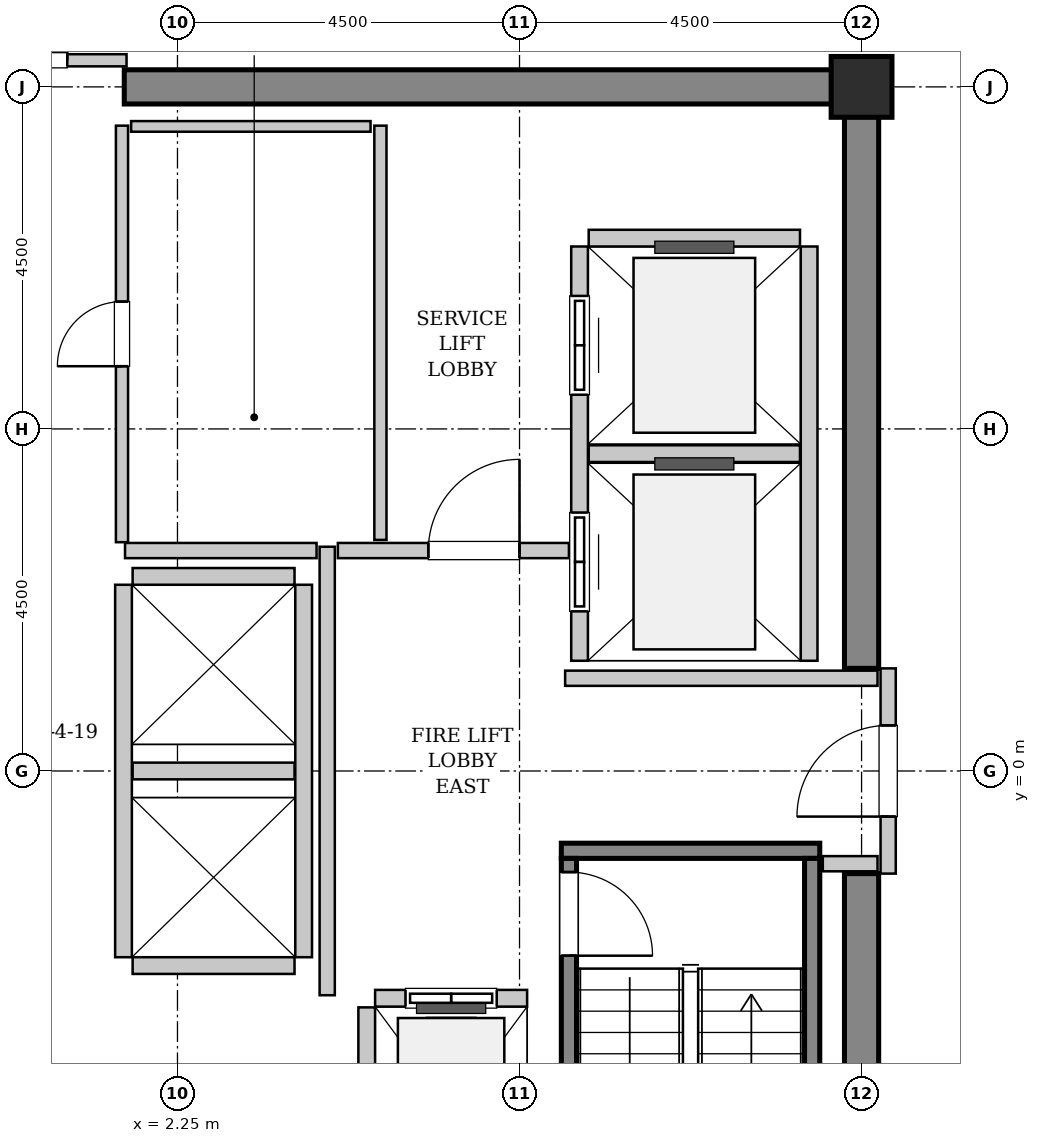
"""IFC4 building model, lengths in metres.
Left out: names, types, materials, properties, quantities, classifications, styles, units other than length and angle.
Written with IfcOpenShell. Run it as: python <this file> out.ifc"""

import sys

from ifc_helpers import new_model, si_unit, direction, frame, frame_2d, origin, origin_2d, place, context, subcontext, project, spatial, rectangle, hollow_rectangle, extrude, source, transform, mapped, element, fill, save


model = new_model("IFC4")
c1 = context("Model", 3, precision=1e-05, world=origin(), true_north=direction((0.0, 1.0)))
c2 = subcontext(c1, "Body", "Model", "MODEL_VIEW")
j1 = project(units=[si_unit("LENGTHUNIT", "METRE"), si_unit("PLANEANGLEUNIT", "RADIAN")], contexts=[c1])
p1 = place(None, origin())
s1 = spatial("IfcSite", under=j1, at=p1, CompositionType="ELEMENT")
p2 = place(p1, origin())
s2 = spatial("IfcBuilding", under=s1, at=p2, CompositionType="ELEMENT")
p3 = place(p2, frame((0.0, 0.0, 214.2)))
s3 = spatial("IfcBuildingStorey", under=s2, at=p3, CompositionType="ELEMENT", Elevation=214.2)
m1 = source(origin(), c2, "Body", "SweptSolid", [
    extrude(rectangle(XDim=9.925, YDim=0.45, at=frame_2d((4.962, 0.0))), origin(), (0.0, 0.0, 1.0), 3.8),
])
p4 = place(p3, frame((1.55, 9.0, 0.0), z_axis=(0.0, 0.0, 1.0), x_axis=(1.0, 0.0, 0.0)))
e1 = element("IfcWall", 1, at=p4, inside=s3, PredefinedType="SHEAR", context=c2, shape_type="MappedRepresentation", body=[
    mapped(m1, transform((0.0, 0.0, 0.0), x_axis=(1.0, 0.0, 0.0), y_axis=(0.0, 1.0, 0.0), z_axis=(0.0, 0.0, 1.0), scale=1.0)),
])
m2 = source(origin(), c2, "Body", "SweptSolid", [
    extrude(rectangle(XDim=7.425, YDim=0.45, at=frame_2d((3.712, 0.0))), origin(), (0.0, 0.0, 1.0), 3.8),
])
for number, where, z_axis, x_axis in (
    (2, (11.25, -8.775, 0.0), (0.0, 0.0, 1.0), (0.0, 1.0, 0.0)),
    (3, (11.25, 1.35, 0.0), (0.0, 0.0, 1.0), (0.0, 1.0, 0.0)),
):
    element("IfcWall", number, at=place(p3, frame(where, z_axis=z_axis, x_axis=x_axis)), inside=s3, PredefinedType="SHEAR", context=c2, shape_type="MappedRepresentation", body=[
        mapped(m2, transform((0.0, 0.0, 0.0), x_axis=(1.0, 0.0, 0.0), y_axis=(0.0, 1.0, 0.0), z_axis=(0.0, 0.0, 1.0), scale=1.0)),
    ])
m3 = source(origin(), c2, "Body", "SweptSolid", [
    extrude(hollow_rectangle(XDim=0.8, YDim=0.8, WallThickness=0.04, InnerFilletRadius=0.04, OuterFilletRadius=0.08, at=origin_2d()), origin(), (0.0, 0.0, 1.0), 3.8),
])
p5 = place(p3, frame((11.25, 9.0, 0.0), z_axis=(0.0, 0.0, 1.0), x_axis=(1.0, 0.0, 0.0)))
e4 = element("IfcColumn", 4, at=p5, inside=s3, PredefinedType="COLUMN", context=c2, shape_type="MappedRepresentation", body=[
    mapped(m3, transform((0.0, 0.0, 0.0), x_axis=(1.0, 0.0, 0.0), y_axis=(0.0, 1.0, 0.0), z_axis=(0.0, 0.0, 1.0), scale=1.0)),
])
m4 = source(origin(), c2, "Body", "SweptSolid", [
    extrude(rectangle(XDim=3.4, YDim=0.2, at=frame_2d((1.7, 0.0))), origin(), (0.0, 0.0, 1.0), 3.8),
])
p6 = place(p3, frame((7.3, -1.05, 0.0), z_axis=(0.0, 0.0, 1.0), x_axis=(1.0, 0.0, 0.0)))
e5 = element("IfcWall", 5, at=p6, inside=s3, PredefinedType="SOLIDWALL", context=c2, shape_type="MappedRepresentation", body=[
    mapped(m4, transform((0.0, 0.0, 0.0), x_axis=(1.0, 0.0, 0.0), y_axis=(0.0, 1.0, 0.0), z_axis=(0.0, 0.0, 1.0), scale=1.0)),
])
m5 = source(origin(), c2, "Body", "SweptSolid", [
    extrude(rectangle(XDim=7.1, YDim=0.2, at=frame_2d((3.55, 0.0))), origin(), (0.0, 0.0, 1.0), 3.8),
])
p7 = place(p3, frame((7.4, -1.15, 0.0), z_axis=(0.0, 0.0, 1.0), x_axis=(0.0, -1.0, 0.0)))
e6 = element("IfcWall", 6, at=p7, inside=s3, PredefinedType="SOLIDWALL", context=c2, shape_type="MappedRepresentation", body=[
    mapped(m5, transform((0.0, 0.0, 0.0), x_axis=(1.0, 0.0, 0.0), y_axis=(0.0, 1.0, 0.0), z_axis=(0.0, 0.0, 1.0), scale=1.0)),
])
p8 = place(p7, frame((0.18, 0.0, 0.0)))
e7 = element("IfcOpeningElement", 7, at=p8, cuts=e6, PredefinedType="OPENING", context=c2, shape_type="SweptSolid", body=[
    extrude(rectangle(XDim=1.1, YDim=2.15, at=frame_2d((0.55, 1.075))), frame((0.0, 0.11, 0.0), z_axis=(0.0, -1.0, 0.0), x_axis=(1.0, 0.0, 0.0)), (0.0, 0.0, 1.0), 0.22),
])
p9 = place(p3, frame((10.6, -1.15, 0.0), z_axis=(0.0, 0.0, 1.0), x_axis=(0.0, -1.0, 0.0)))
e8 = element("IfcWall", 8, at=p9, inside=s3, PredefinedType="SOLIDWALL", context=c2, shape_type="MappedRepresentation", body=[
    mapped(m5, transform((0.0, 0.0, 0.0), x_axis=(1.0, 0.0, 0.0), y_axis=(0.0, 1.0, 0.0), z_axis=(0.0, 0.0, 1.0), scale=1.0)),
])
m6 = source(origin(), c2, "Body", "SweptSolid", [
    extrude(rectangle(XDim=2.0, YDim=0.22, at=frame_2d((1.0, 0.0))), origin(), (0.0, 0.0, 1.0), 3.535),
])
p10 = place(p3, frame((6.85, -2.99, 0.0), z_axis=(0.0, 0.0, 1.0), x_axis=(-1.0, 0.0, 0.0)))
e9 = element("IfcWall", 9, at=p10, inside=s3, PredefinedType="SOLIDWALL", context=c2, shape_type="MappedRepresentation", body=[
    mapped(m6, transform((0.0, 0.0, 0.0), x_axis=(1.0, 0.0, 0.0), y_axis=(0.0, 1.0, 0.0), z_axis=(0.0, 0.0, 1.0), scale=1.0)),
])
p11 = place(p10, frame((0.4, 0.0, 0.0)))
e10 = element("IfcOpeningElement", 10, at=p11, cuts=e9, PredefinedType="OPENING", context=c2, shape_type="SweptSolid", body=[
    extrude(rectangle(XDim=1.2, YDim=2.2, at=frame_2d((0.6, 1.1))), frame((0.0, 0.12, 0.0), z_axis=(0.0, -1.0, 0.0), x_axis=(1.0, 0.0, 0.0)), (0.0, 0.0, 1.0), 0.24),
])
m7 = source(origin(), c2, "Body", "SweptSolid", [
    extrude(rectangle(XDim=2.68, YDim=0.22, at=frame_2d((1.34, 0.0))), origin(), (0.0, 0.0, 1.0), 3.535),
])
p12 = place(p3, frame((4.74, -3.11, 0.0), z_axis=(0.0, 0.0, 1.0), x_axis=(0.0, -1.0, 0.0)))
e11 = element("IfcWall", 11, at=p12, inside=s3, PredefinedType="SOLIDWALL", context=c2, shape_type="MappedRepresentation", body=[
    mapped(m7, transform((0.0, 0.0, 0.0), x_axis=(1.0, 0.0, 0.0), y_axis=(0.0, 1.0, 0.0), z_axis=(0.0, 0.0, 1.0), scale=1.0)),
])
m8 = source(origin(), c2, "Body", "SweptSolid", [
    extrude(rectangle(XDim=5.45, YDim=0.22, at=frame_2d((2.725, 0.0))), origin(), (0.0, 0.0, 1.0), 3.535),
])
p13 = place(p3, frame((7.54, 6.9, 0.0), z_axis=(0.0, 0.0, 1.0), x_axis=(0.0, -1.0, 0.0)))
e12 = element("IfcWall", 12, at=p13, inside=s3, PredefinedType="SOLIDWALL", context=c2, shape_type="MappedRepresentation", body=[
    mapped(m8, transform((0.0, 0.0, 0.0), x_axis=(1.0, 0.0, 0.0), y_axis=(0.0, 1.0, 0.0), z_axis=(0.0, 0.0, 1.0), scale=1.0)),
])
p14 = place(p13, frame((3.5, 0.0, 0.0)))
e13 = element("IfcOpeningElement", 13, at=p14, cuts=e12, PredefinedType="OPENING", context=c2, shape_type="SweptSolid", body=[
    extrude(rectangle(XDim=1.3, YDim=2.3, at=frame_2d((0.65, 1.15))), frame((0.0, 0.12, 0.0), z_axis=(0.0, -1.0, 0.0), x_axis=(1.0, 0.0, 0.0)), (0.0, 0.0, 1.0), 0.24),
])
p15 = place(p13, frame((0.65, 0.0, 0.0)))
e14 = element("IfcOpeningElement", 14, at=p15, cuts=e12, PredefinedType="OPENING", context=c2, shape_type="SweptSolid", body=[
    extrude(rectangle(XDim=1.3, YDim=2.3, at=frame_2d((0.65, 1.15))), frame((0.0, 0.12, 0.0), z_axis=(0.0, -1.0, 0.0), x_axis=(1.0, 0.0, 0.0)), (0.0, 0.0, 1.0), 0.24),
])
p16 = place(p3, frame((10.56, 1.45, 0.0), z_axis=(0.0, 0.0, 1.0), x_axis=(0.0, 1.0, 0.0)))
e15 = element("IfcWall", 15, at=p16, inside=s3, PredefinedType="SOLIDWALL", context=c2, shape_type="MappedRepresentation", body=[
    mapped(m8, transform((0.0, 0.0, 0.0), x_axis=(1.0, 0.0, 0.0), y_axis=(0.0, 1.0, 0.0), z_axis=(0.0, 0.0, 1.0), scale=1.0)),
])
m9 = source(origin(), c2, "Body", "SweptSolid", [
    extrude(rectangle(XDim=2.78, YDim=0.22, at=frame_2d((1.39, 0.0))), origin(), (0.0, 0.0, 1.0), 3.535),
])
for number, where, z_axis, x_axis in (
    (16, (7.66, 4.175, 0.0), (0.0, 0.0, 1.0), (1.0, 0.0, 0.0)),
    (17, (10.44, 7.01, 0.0), (0.0, 0.0, 1.0), (-1.0, 0.0, 0.0)),
):
    element("IfcWall", number, at=place(p3, frame(where, z_axis=z_axis, x_axis=x_axis)), inside=s3, PredefinedType="SOLIDWALL", context=c2, shape_type="MappedRepresentation", body=[
        mapped(m9, transform((0.0, 0.0, 0.0), x_axis=(1.0, 0.0, 0.0), y_axis=(0.0, 1.0, 0.0), z_axis=(0.0, 0.0, 1.0), scale=1.0)),
    ])
m10 = source(origin(), c2, "Body", "SweptSolid", [
    extrude(rectangle(XDim=4.9, YDim=0.22, at=frame_2d((2.45, 0.0))), origin(), (0.0, 0.0, 1.0), 3.535),
])
for number, where, z_axis, x_axis in (
    (18, (1.54, 2.45, 0.0), (0.0, 0.0, 1.0), (0.0, -1.0, 0.0)),
    (19, (3.91, -2.45, 0.0), (0.0, 0.0, 1.0), (0.0, 1.0, 0.0)),
):
    element("IfcWall", number, at=place(p3, frame(where, z_axis=z_axis, x_axis=x_axis)), inside=s3, PredefinedType="SOLIDWALL", context=c2, shape_type="MappedRepresentation", body=[
        mapped(m10, transform((0.0, 0.0, 0.0), x_axis=(1.0, 0.0, 0.0), y_axis=(0.0, 1.0, 0.0), z_axis=(0.0, 0.0, 1.0), scale=1.0)),
    ])
m11 = source(origin(), c2, "Body", "SweptSolid", [
    extrude(rectangle(XDim=2.13, YDim=0.22, at=frame_2d((1.065, 0.0))), origin(), (0.0, 0.0, 1.0), 3.535),
])
for number, where, z_axis, x_axis in (
    (20, (1.66, -2.56, 0.0), (0.0, 0.0, 1.0), (1.0, 0.0, 0.0)),
    (21, (1.66, 0.0, 0.0), (0.0, 0.0, 1.0), (1.0, 0.0, 0.0)),
    (22, (3.79, 2.56, 0.0), (0.0, 0.0, 1.0), (-1.0, 0.0, 0.0)),
):
    element("IfcWall", number, at=place(p3, frame(where, z_axis=z_axis, x_axis=x_axis)), inside=s3, PredefinedType="SOLIDWALL", context=c2, shape_type="MappedRepresentation", body=[
        mapped(m11, transform((0.0, 0.0, 0.0), x_axis=(1.0, 0.0, 0.0), y_axis=(0.0, 1.0, 0.0), z_axis=(0.0, 0.0, 1.0), scale=1.0)),
    ])
m12 = source(origin(), c2, "Body", "SweptSolid", [
    extrude(rectangle(XDim=2.7, YDim=0.2, at=frame_2d((1.35, 0.0))), origin(), (0.0, 0.0, 1.0), 2.625),
])
p17 = place(p3, frame((11.6, -1.35, 0.0), z_axis=(0.0, 0.0, 1.0), x_axis=(0.0, 1.0, 0.0)))
e23 = element("IfcWall", 23, at=p17, inside=s3, PredefinedType="PARTITIONING", context=c2, shape_type="MappedRepresentation", body=[
    mapped(m12, transform((0.0, 0.0, 0.0), x_axis=(1.0, 0.0, 0.0), y_axis=(0.0, 1.0, 0.0), z_axis=(0.0, 0.0, 1.0), scale=1.0)),
])
p18 = place(p17, frame((0.75, 0.0, 0.0)))
e24 = element("IfcOpeningElement", 24, at=p18, cuts=e23, PredefinedType="OPENING", context=c2, shape_type="SweptSolid", body=[
    extrude(rectangle(XDim=1.2, YDim=2.15, at=frame_2d((0.6, 1.075))), frame((0.0, 0.11, 0.0), z_axis=(0.0, -1.0, 0.0), x_axis=(1.0, 0.0, 0.0)), (0.0, 0.0, 1.0), 0.22),
])
m13 = source(origin(), c2, "Body", "SweptSolid", [
    extrude(rectangle(XDim=5.9, YDim=0.2, at=frame_2d((2.95, 0.0))), origin(), (0.0, 0.0, 1.0), 3.535),
])
p19 = place(p3, frame((4.22, -2.95, 0.0), z_axis=(0.0, 0.0, 1.0), x_axis=(0.0, 1.0, 0.0)))
e25 = element("IfcWall", 25, at=p19, inside=s3, PredefinedType="PARTITIONING", context=c2, shape_type="MappedRepresentation", body=[
    mapped(m13, transform((0.0, 0.0, 0.0), x_axis=(1.0, 0.0, 0.0), y_axis=(0.0, 1.0, 0.0), z_axis=(0.0, 0.0, 1.0), scale=1.0)),
])
m14 = source(origin(), c2, "Body", "SweptSolid", [
    extrude(rectangle(XDim=2.52, YDim=0.2, at=frame_2d((1.26, 0.0))), origin(), (0.0, 0.0, 1.0), 3.535),
])
p20 = place(p3, frame((1.56, 2.9, 0.0), z_axis=(0.0, 0.0, 1.0), x_axis=(1.0, 0.0, 0.0)))
e26 = element("IfcWall", 26, at=p20, inside=s3, PredefinedType="PARTITIONING", context=c2, shape_type="MappedRepresentation", body=[
    mapped(m14, transform((0.0, 0.0, 0.0), x_axis=(1.0, 0.0, 0.0), y_axis=(0.0, 1.0, 0.0), z_axis=(0.0, 0.0, 1.0), scale=1.0)),
])
m15 = source(origin(), c2, "Body", "SweptSolid", [
    extrude(rectangle(XDim=3.04, YDim=0.2, at=frame_2d((1.52, 0.0))), origin(), (0.0, 0.0, 1.0), 3.535),
])
p21 = place(p3, frame((4.36, 2.9, 0.0), z_axis=(0.0, 0.0, 1.0), x_axis=(1.0, 0.0, 0.0)))
e27 = element("IfcWall", 27, at=p21, inside=s3, PredefinedType="PARTITIONING", context=c2, shape_type="MappedRepresentation", body=[
    mapped(m15, transform((0.0, 0.0, 0.0), x_axis=(1.0, 0.0, 0.0), y_axis=(0.0, 1.0, 0.0), z_axis=(0.0, 0.0, 1.0), scale=1.0)),
])
p22 = place(p21, frame((1.19, 0.0, 0.0)))
e28 = element("IfcOpeningElement", 28, at=p22, cuts=e27, PredefinedType="OPENING", context=c2, shape_type="SweptSolid", body=[
    extrude(rectangle(XDim=1.2, YDim=2.15, at=frame_2d((0.6, 1.075))), frame((0.0, 0.11, 0.0), z_axis=(0.0, -1.0, 0.0), x_axis=(1.0, 0.0, 0.0)), (0.0, 0.0, 1.0), 0.22),
])
m16 = source(origin(), c2, "Body", "SweptSolid", [
    extrude(rectangle(XDim=4.11, YDim=0.2, at=frame_2d((2.055, 0.0))), origin(), (0.0, 0.0, 1.0), 3.535),
])
p23 = place(p3, frame((7.35, 1.22, 0.0), z_axis=(0.0, 0.0, 1.0), x_axis=(1.0, 0.0, 0.0)))
e29 = element("IfcWall", 29, at=p23, inside=s3, PredefinedType="PARTITIONING", context=c2, shape_type="MappedRepresentation", body=[
    mapped(m16, transform((0.0, 0.0, 0.0), x_axis=(1.0, 0.0, 0.0), y_axis=(0.0, 1.0, 0.0), z_axis=(0.0, 0.0, 1.0), scale=1.0)),
])
m17 = source(origin(), c2, "Body", "SweptSolid", [
    extrude(rectangle(XDim=0.72, YDim=0.2, at=frame_2d((0.36, 0.0))), origin(), (0.0, 0.0, 1.0), 3.535),
])
p24 = place(p3, frame((10.74, -1.22, 0.0), z_axis=(0.0, 0.0, 1.0), x_axis=(1.0, 0.0, 0.0)))
e30 = element("IfcWall", 30, at=p24, inside=s3, PredefinedType="PARTITIONING", context=c2, shape_type="MappedRepresentation", body=[
    mapped(m17, transform((0.0, 0.0, 0.0), x_axis=(1.0, 0.0, 0.0), y_axis=(0.0, 1.0, 0.0), z_axis=(0.0, 0.0, 1.0), scale=1.0)),
])
m18 = source(origin(), c2, "Body", "SweptSolid", [
    extrude(rectangle(XDim=3.16, YDim=0.16, at=frame_2d((1.58, 0.0))), origin(), (0.0, 0.0, 1.0), 2.625),
])
p25 = place(p3, frame((-1.58, 9.35, 0.0), z_axis=(0.0, 0.0, 1.0), x_axis=(1.0, 0.0, 0.0)))
e31 = element("IfcWall", 31, at=p25, inside=s3, PredefinedType="PARTITIONING", context=c2, shape_type="MappedRepresentation", body=[
    mapped(m18, transform((0.0, 0.0, 0.0), x_axis=(1.0, 0.0, 0.0), y_axis=(0.0, 1.0, 0.0), z_axis=(0.0, 0.0, 1.0), scale=1.0)),
])
p26 = place(p25, frame((0.78, 0.0, 0.0)))
e32 = element("IfcOpeningElement", 32, at=p26, cuts=e31, PredefinedType="OPENING", context=c2, shape_type="SweptSolid", body=[
    extrude(rectangle(XDim=1.6, YDim=2.3, at=frame_2d((0.8, 1.15))), frame((0.0, 0.09, 0.0), z_axis=(0.0, -1.0, 0.0), x_axis=(1.0, 0.0, 0.0)), (0.0, 0.0, 1.0), 0.18),
])
m19 = source(origin(), c2, "Body", "SweptSolid", [
    extrude(rectangle(XDim=5.45, YDim=0.16, at=frame_2d((2.725, 0.0))), origin(), (0.0, 0.0, 1.0), 3.535),
])
p27 = place(p3, frame((4.92, 3.04, 0.0), z_axis=(0.0, 0.0, 1.0), x_axis=(0.0, 1.0, 0.0)))
e33 = element("IfcWall", 33, at=p27, inside=s3, PredefinedType="PARTITIONING", context=c2, shape_type="MappedRepresentation", body=[
    mapped(m19, transform((0.0, 0.0, 0.0), x_axis=(1.0, 0.0, 0.0), y_axis=(0.0, 1.0, 0.0), z_axis=(0.0, 0.0, 1.0), scale=1.0)),
])
m20 = source(origin(), c2, "Body", "SweptSolid", [
    extrude(rectangle(XDim=5.48, YDim=0.16, at=frame_2d((2.74, 0.0))), origin(), (0.0, 0.0, 1.0), 3.535),
])
p28 = place(p3, frame((1.52, 3.01, 0.0), z_axis=(0.0, 0.0, 1.0), x_axis=(0.0, 1.0, 0.0)))
e34 = element("IfcWall", 34, at=p28, inside=s3, PredefinedType="PARTITIONING", context=c2, shape_type="MappedRepresentation", body=[
    mapped(m20, transform((0.0, 0.0, 0.0), x_axis=(1.0, 0.0, 0.0), y_axis=(0.0, 1.0, 0.0), z_axis=(0.0, 0.0, 1.0), scale=1.0)),
])
p29 = place(p28, frame((2.315, 0.0, 0.0)))
e35 = element("IfcOpeningElement", 35, at=p29, cuts=e34, PredefinedType="OPENING", context=c2, shape_type="SweptSolid", body=[
    extrude(rectangle(XDim=0.85, YDim=2.1, at=frame_2d((0.425, 1.05))), frame((0.0, 0.09, 0.0), z_axis=(0.0, -1.0, 0.0), x_axis=(1.0, 0.0, 0.0)), (0.0, 0.0, 1.0), 0.18),
])
m21 = source(origin(), c2, "Body", "SweptSolid", [
    extrude(rectangle(XDim=3.15, YDim=0.14, at=frame_2d((1.575, 0.0))), origin(), (0.0, 0.0, 1.0), 3.535),
])
p30 = place(p3, frame((1.64, 8.48, 0.0), z_axis=(0.0, 0.0, 1.0), x_axis=(1.0, 0.0, 0.0)))
e36 = element("IfcWall", 36, at=p30, inside=s3, PredefinedType="PARTITIONING", context=c2, shape_type="MappedRepresentation", body=[
    mapped(m21, transform((0.0, 0.0, 0.0), x_axis=(1.0, 0.0, 0.0), y_axis=(0.0, 1.0, 0.0), z_axis=(0.0, 0.0, 1.0), scale=1.0)),
])
m22 = source(origin(), c2, "Body", "SweptSolid", [
    extrude(rectangle(XDim=1.1, YDim=2.15, at=frame_2d((0.55, 1.075))), frame((0.0, 0.025, 0.0), z_axis=(0.0, -1.0, 0.0), x_axis=(1.0, 0.0, 0.0)), (0.0, 0.0, 1.0), 0.05),
])
p31 = place(p8, origin())
e37 = element("IfcDoor", 37, at=p31, inside=s3, OperationType="SINGLE_SWING_RIGHT", PredefinedType="DOOR", context=c2, shape_type="MappedRepresentation", body=[
    mapped(m22, transform((0.0, 0.0, 0.0), x_axis=(1.0, 0.0, 0.0), y_axis=(0.0, 1.0, 0.0), z_axis=(0.0, 0.0, 1.0), scale=1.0)),
])
fill(e7, e37)
m23 = source(origin(), c2, "Body", "SweptSolid", [
    extrude(rectangle(XDim=1.2, YDim=2.2, at=frame_2d((0.6, 1.1))), frame((0.0, 0.025, 0.0), z_axis=(0.0, -1.0, 0.0), x_axis=(1.0, 0.0, 0.0)), (0.0, 0.0, 1.0), 0.05),
])
p32 = place(p11, origin())
e38 = element("IfcDoor", 38, at=p32, inside=s3, OperationType="SLIDING_TO_LEFT", PredefinedType="DOOR", context=c2, shape_type="MappedRepresentation", body=[
    mapped(m23, transform((0.0, 0.0, 0.0), x_axis=(1.0, 0.0, 0.0), y_axis=(0.0, 1.0, 0.0), z_axis=(0.0, 0.0, 1.0), scale=1.0)),
])
fill(e10, e38)
m24 = source(origin(), c2, "Body", "SweptSolid", [
    extrude(rectangle(XDim=1.3, YDim=2.3, at=frame_2d((0.65, 1.15))), frame((0.0, 0.025, 0.0), z_axis=(0.0, -1.0, 0.0), x_axis=(1.0, 0.0, 0.0)), (0.0, 0.0, 1.0), 0.05),
])
p33 = place(p14, origin())
e39 = element("IfcDoor", 39, at=p33, inside=s3, OperationType="SLIDING_TO_RIGHT", PredefinedType="DOOR", context=c2, shape_type="MappedRepresentation", body=[
    mapped(m24, transform((0.0, 0.0, 0.0), x_axis=(1.0, 0.0, 0.0), y_axis=(0.0, 1.0, 0.0), z_axis=(0.0, 0.0, 1.0), scale=1.0)),
])
fill(e13, e39)
p34 = place(p15, origin())
e40 = element("IfcDoor", 40, at=p34, inside=s3, OperationType="SLIDING_TO_RIGHT", PredefinedType="DOOR", context=c2, shape_type="MappedRepresentation", body=[
    mapped(m24, transform((0.0, 0.0, 0.0), x_axis=(1.0, 0.0, 0.0), y_axis=(0.0, 1.0, 0.0), z_axis=(0.0, 0.0, 1.0), scale=1.0)),
])
fill(e14, e40)
m25 = source(origin(), c2, "Body", "SweptSolid", [
    extrude(rectangle(XDim=1.2, YDim=2.15, at=frame_2d((0.6, 1.075))), frame((0.0, 0.025, 0.0), z_axis=(0.0, -1.0, 0.0), x_axis=(1.0, 0.0, 0.0)), (0.0, 0.0, 1.0), 0.05),
])
p35 = place(p18, origin())
e41 = element("IfcDoor", 41, at=p35, inside=s3, OperationType="SINGLE_SWING_LEFT", PredefinedType="DOOR", context=c2, shape_type="MappedRepresentation", body=[
    mapped(m25, transform((0.0, 0.0, 0.0), x_axis=(1.0, 0.0, 0.0), y_axis=(0.0, 1.0, 0.0), z_axis=(0.0, 0.0, 1.0), scale=1.0)),
])
fill(e24, e41)
p36 = place(p22, origin())
e42 = element("IfcDoor", 42, at=p36, inside=s3, OperationType="SINGLE_SWING_RIGHT", PredefinedType="DOOR", context=c2, shape_type="MappedRepresentation", body=[
    mapped(m25, transform((0.0, 0.0, 0.0), x_axis=(1.0, 0.0, 0.0), y_axis=(0.0, 1.0, 0.0), z_axis=(0.0, 0.0, 1.0), scale=1.0)),
])
fill(e28, e42)
m26 = source(origin(), c2, "Body", "SweptSolid", [
    extrude(rectangle(XDim=1.6, YDim=2.3, at=frame_2d((0.8, 1.15))), frame((0.0, 0.025, 0.0), z_axis=(0.0, -1.0, 0.0), x_axis=(1.0, 0.0, 0.0)), (0.0, 0.0, 1.0), 0.05),
])
p37 = place(p26, origin())
e43 = element("IfcDoor", 43, at=p37, inside=s3, OperationType="DOUBLE_DOOR_SINGLE_SWING", PredefinedType="DOOR", context=c2, shape_type="MappedRepresentation", body=[
    mapped(m26, transform((0.0, 0.0, 0.0), x_axis=(1.0, 0.0, 0.0), y_axis=(0.0, 1.0, 0.0), z_axis=(0.0, 0.0, 1.0), scale=1.0)),
])
fill(e32, e43)
m27 = source(origin(), c2, "Body", "SweptSolid", [
    extrude(rectangle(XDim=0.85, YDim=2.1, at=frame_2d((0.425, 1.05))), frame((0.0, 0.025, 0.0), z_axis=(0.0, -1.0, 0.0), x_axis=(1.0, 0.0, 0.0)), (0.0, 0.0, 1.0), 0.05),
])
p38 = place(p29, origin())
e44 = element("IfcDoor", 44, at=p38, inside=s3, OperationType="SINGLE_SWING_LEFT", PredefinedType="DOOR", context=c2, shape_type="MappedRepresentation", body=[
    mapped(m27, transform((0.0, 0.0, 0.0), x_axis=(1.0, 0.0, 0.0), y_axis=(0.0, 1.0, 0.0), z_axis=(0.0, 0.0, 1.0), scale=1.0)),
])
fill(e35, e44)
save(model, sys.argv[1])
